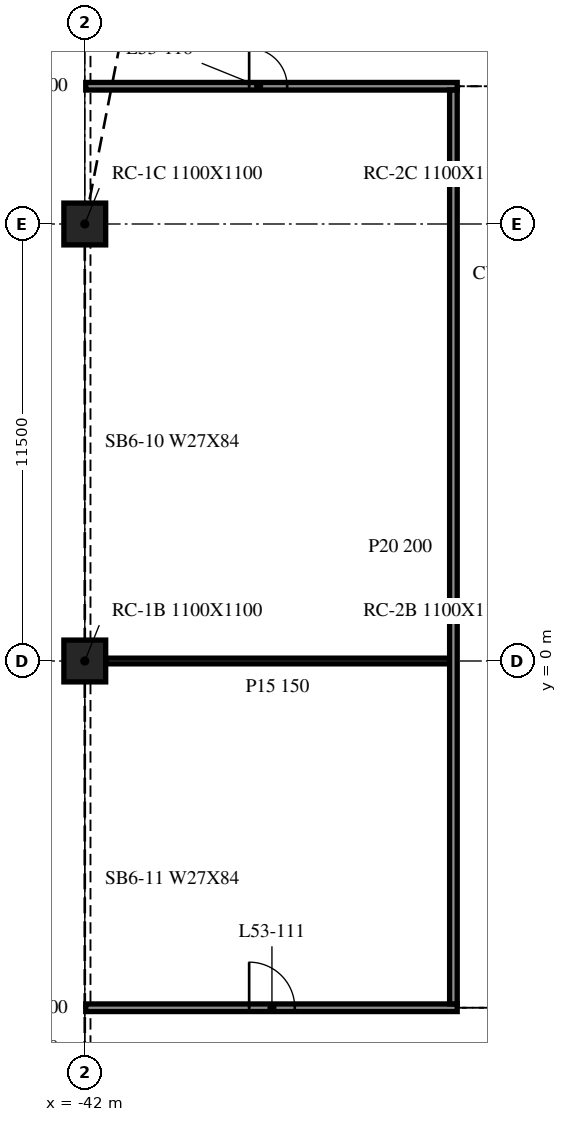
"""IFC4 building model, lengths in metres.
Left out: names, types, materials, properties, quantities, classifications, styles, units other than length and angle.
Written with IfcOpenShell. Run it as: python <this file> out.ifc"""

import sys

from ifc_helpers import new_model, si_unit, direction, frame, frame_2d, origin, origin_2d, place, context, subcontext, project, spatial, rectangle, extrude, element, fill, save


model = new_model("IFC4")
c1 = context("Model", 3, precision=1e-05, world=origin(), true_north=direction((0.0, 1.0)))
c2 = subcontext(c1, "Body", "Model", "MODEL_VIEW")
j1 = project(units=[si_unit("LENGTHUNIT", "METRE"), si_unit("PLANEANGLEUNIT", "RADIAN")], contexts=[c1])
p1 = place(None, origin())
s1 = spatial("IfcSite", under=j1, at=p1, CompositionType="ELEMENT")
p2 = place(p1, origin())
s2 = spatial("IfcBuilding", under=s1, at=p2, CompositionType="ELEMENT")
p3 = place(p2, frame((0.0, 0.0, 220.5)))
s3 = spatial("IfcBuildingStorey", under=s2, at=p3, CompositionType="ELEMENT", Elevation=220.5)
for number, where, z_axis, x_axis in (
    (1, (-42.0, 0.0, -0.34), (0.0, 0.0, 1.0), (1.0, 0.0, 0.0)),
    (2, (-42.0, 11.5, -0.34), (0.0, 0.0, 1.0), (1.0, 0.0, 0.0)),
):
    element("IfcColumn", number, at=place(p3, frame(where, z_axis=z_axis, x_axis=x_axis)), inside=s3, PredefinedType="COLUMN", context=c2, shape_type="SweptSolid", body=[
        extrude(rectangle(XDim=1.1, YDim=1.1, at=origin_2d()), origin(), (0.0, 0.0, 1.0), 3.74),
    ])
p4 = place(p3, frame((-41.975, -9.125, 0.0), z_axis=(0.0, 0.0, 1.0), x_axis=(1.0, 0.0, 0.0)))
e3 = element("IfcWall", 3, at=p4, inside=s3, PredefinedType="PARTITIONING", context=c2, shape_type="SweptSolid", body=[
    extrude(rectangle(XDim=9.775, YDim=0.2, at=frame_2d((4.888, 0.0))), origin(), (0.0, 0.0, 1.0), 3.4),
])
p5 = place(p4, frame((4.3, 0.0, 0.0)))
e4 = element("IfcOpeningElement", 4, at=p5, cuts=e3, PredefinedType="OPENING", context=c2, shape_type="SweptSolid", body=[
    extrude(rectangle(XDim=1.2, YDim=2.1, at=frame_2d((0.6, 1.05))), frame((0.0, 0.11, 0.0), z_axis=(0.0, -1.0, 0.0), x_axis=(1.0, 0.0, 0.0)), (0.0, 0.0, 1.0), 0.22),
])
p6 = place(p3, frame((-41.45, 0.0, 0.0), z_axis=(0.0, 0.0, 1.0), x_axis=(1.0, 0.0, 0.0)))
e5 = element("IfcWall", 5, at=p6, inside=s3, PredefinedType="PARTITIONING", context=c2, shape_type="SweptSolid", body=[
    extrude(rectangle(XDim=9.05, YDim=0.15, at=frame_2d((4.525, 0.0))), origin(), (0.0, 0.0, 1.0), 3.4),
])
p7 = place(p3, frame((-41.975, 15.125, 0.0), z_axis=(0.0, 0.0, 1.0), x_axis=(1.0, 0.0, 0.0)))
e6 = element("IfcWall", 6, at=p7, inside=s3, PredefinedType="PARTITIONING", context=c2, shape_type="SweptSolid", body=[
    extrude(rectangle(XDim=9.775, YDim=0.2, at=frame_2d((4.888, 0.0))), origin(), (0.0, 0.0, 1.0), 3.4),
])
p8 = place(p7, frame((4.3, 0.0, 0.0)))
e7 = element("IfcOpeningElement", 7, at=p8, cuts=e6, PredefinedType="OPENING", context=c2, shape_type="SweptSolid", body=[
    extrude(rectangle(XDim=1.0, YDim=2.1, at=frame_2d((0.5, 1.05))), frame((0.0, 0.11, 0.0), z_axis=(0.0, -1.0, 0.0), x_axis=(1.0, 0.0, 0.0)), (0.0, 0.0, 1.0), 0.22),
])
p9 = place(p3, frame((-32.3, -9.025, 0.0), z_axis=(0.0, 0.0, 1.0), x_axis=(0.0, 1.0, 0.0)))
e8 = element("IfcWall", 8, at=p9, inside=s3, PredefinedType="PARTITIONING", context=c2, shape_type="SweptSolid", body=[
    extrude(rectangle(XDim=24.05, YDim=0.2, at=frame_2d((12.025, 0.0))), origin(), (0.0, 0.0, 1.0), 3.4),
])
p10 = place(p5, origin())
e9 = element("IfcDoor", 9, at=p10, inside=s3, OperationType="SINGLE_SWING_RIGHT", PredefinedType="DOOR", context=c2, shape_type="SweptSolid", body=[
    extrude(rectangle(XDim=1.2, YDim=2.1, at=frame_2d((0.6, 1.05))), frame((0.0, 0.025, 0.0), z_axis=(0.0, -1.0, 0.0), x_axis=(1.0, 0.0, 0.0)), (0.0, 0.0, 1.0), 0.05),
])
fill(e4, e9)
p11 = place(p8, origin())
e10 = element("IfcDoor", 10, at=p11, inside=s3, OperationType="SINGLE_SWING_RIGHT", PredefinedType="DOOR", context=c2, shape_type="SweptSolid", body=[
    extrude(rectangle(XDim=1.0, YDim=2.1, at=frame_2d((0.5, 1.05))), frame((0.0, 0.025, 0.0), z_axis=(0.0, -1.0, 0.0), x_axis=(1.0, 0.0, 0.0)), (0.0, 0.0, 1.0), 0.05),
])
fill(e7, e10)
save(model, sys.argv[1])
